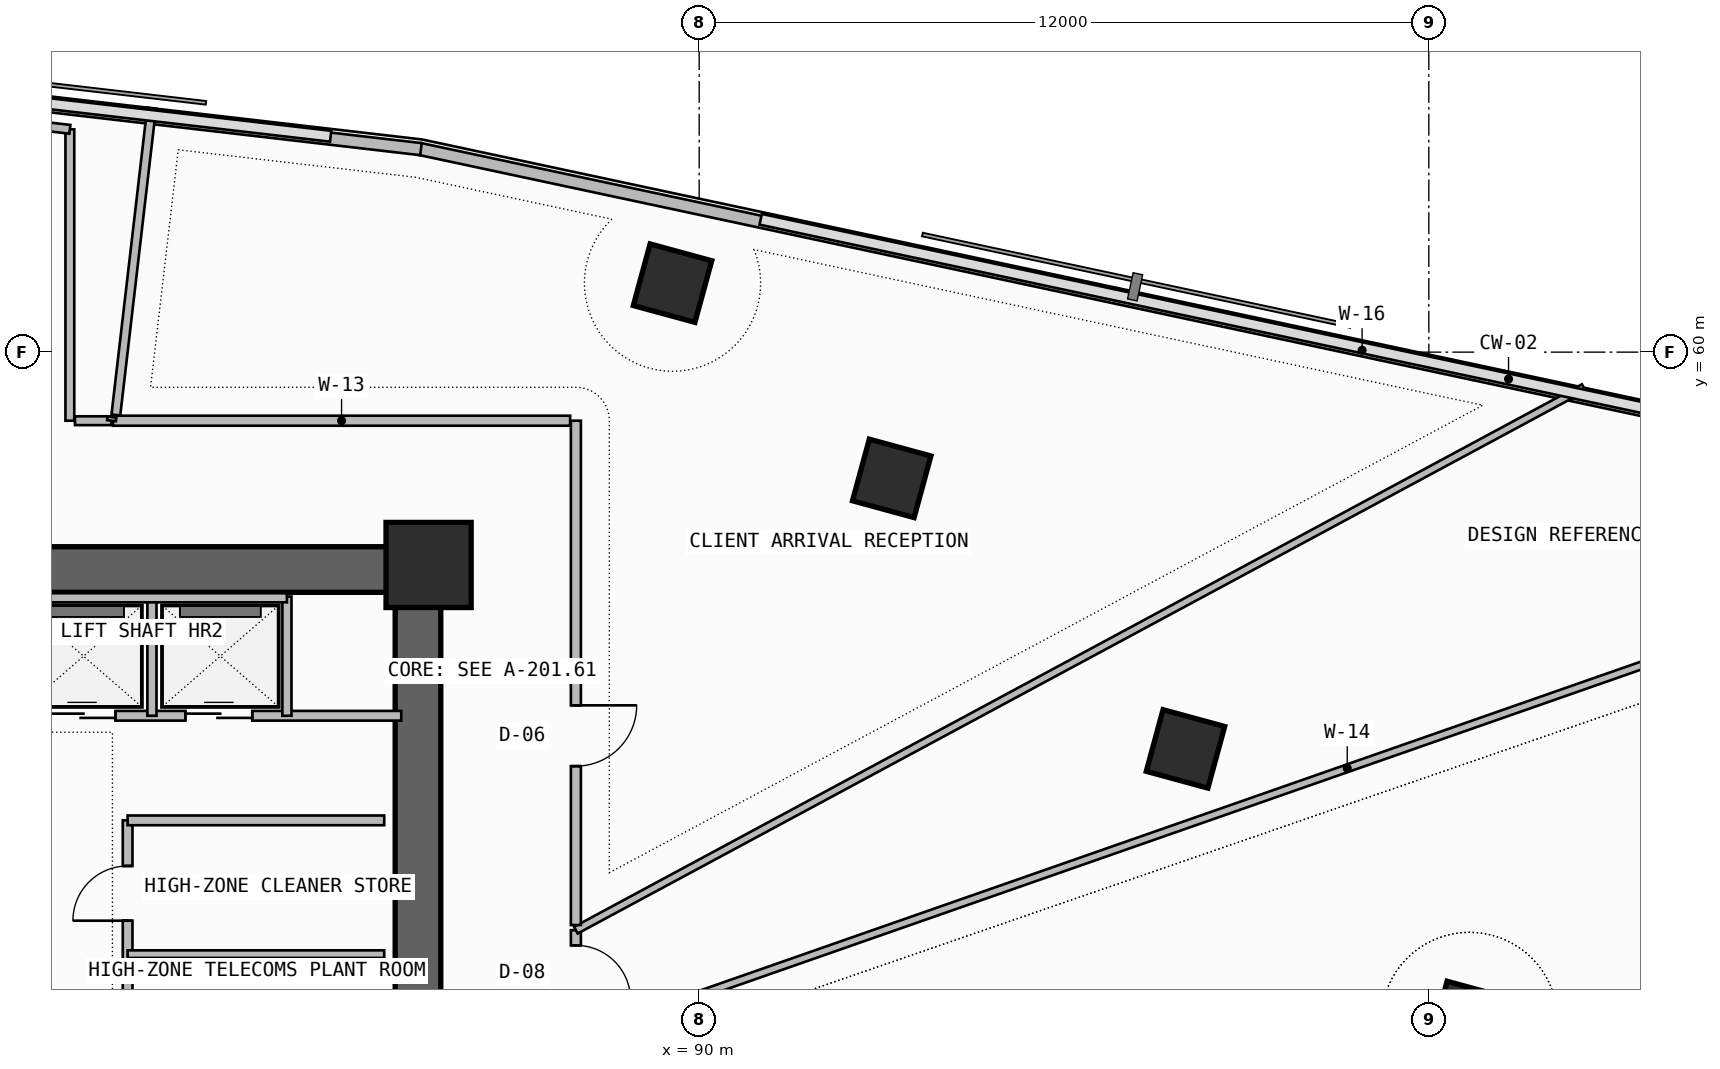
"""IFC4 building model, lengths in metres.
Left out: names, types, materials, properties, quantities, classifications, styles, units other than length and angle.
Written with IfcOpenShell. Run it as: python <this file> out.ifc"""

import sys

from ifc_helpers import new_model, si_unit, direction, frame, frame_2d, origin, origin_2d, place, context, subcontext, project, spatial, rectangle, extrude, element, fill, save


model = new_model("IFC4")
c1 = context("Model", 3, precision=1e-05, world=origin(), true_north=direction((0.0, 1.0)))
c2 = subcontext(c1, "Body", "Model", "MODEL_VIEW")
j1 = project(units=[si_unit("LENGTHUNIT", "METRE"), si_unit("PLANEANGLEUNIT", "RADIAN")], contexts=[c1])
p1 = place(None, origin())
s1 = spatial("IfcSite", under=j1, at=p1, CompositionType="ELEMENT")
p2 = place(p1, origin())
s2 = spatial("IfcBuilding", under=s1, at=p2, CompositionType="ELEMENT")
p3 = place(p2, frame((0.0, 0.0, 218.5)))
s3 = spatial("IfcBuildingStorey", under=s2, at=p3, CompositionType="ELEMENT", Elevation=218.5)
p4 = place(p3, frame((72.0, 56.425, -0.26), z_axis=(0.0, 0.0, 1.0), x_axis=(1.0, 0.0, 0.0)))
e1 = element("IfcWall", 1, at=p4, inside=s3, PredefinedType="SHEAR", context=c2, shape_type="SweptSolid", body=[
    extrude(rectangle(XDim=13.75, YDim=0.75, at=frame_2d((6.875, 0.0))), origin(), (0.0, 0.0, 1.0), 3.52),
])
p5 = place(p3, frame((85.375, 47.6, -0.26), z_axis=(0.0, 0.0, 1.0), x_axis=(0.0, 1.0, 0.0)))
e2 = element("IfcWall", 2, at=p5, inside=s3, PredefinedType="SHEAR", context=c2, shape_type="SweptSolid", body=[
    extrude(rectangle(XDim=8.45, YDim=0.75, at=frame_2d((4.225, 0.0))), origin(), (0.0, 0.0, 1.0), 3.52),
])
p6 = place(p3, frame((85.55, 56.5, 0.0), z_axis=(0.0, 0.0, 1.0), x_axis=(1.0, 0.0, 0.0)))
e3 = element("IfcColumn", 3, at=p6, inside=s3, PredefinedType="COLUMN", context=c2, shape_type="SweptSolid", body=[
    extrude(rectangle(XDim=1.4, YDim=1.4, at=origin_2d()), origin(), (0.0, 0.0, 1.0), 3.52),
])
for number, where, z_axis, x_axis in (
    (4, (102.669, 49.01, 0.0), (0.0, 0.0, 1.0), (0.263, 0.965, 0.0)),
    (5, (97.998, 53.475, 0.0), (0.0, 0.0, 1.0), (0.263, 0.965, 0.0)),
    (6, (93.167, 57.924, 0.0), (0.0, 0.0, 1.0), (0.263, 0.965, 0.0)),
    (7, (89.562, 61.135, 0.0), (0.0, 0.0, 1.0), (0.263, 0.965, 0.0)),
):
    element("IfcColumn", number, at=place(p3, frame(where, z_axis=z_axis, x_axis=x_axis)), inside=s3, PredefinedType="COLUMN", context=c2, shape_type="SweptSolid", body=[
        extrude(rectangle(XDim=1.05, YDim=1.05, at=origin_2d()), origin(), (0.0, 0.0, 1.0), 3.52),
    ])
p7 = place(p3, frame((104.791, 47.25, 0.0), z_axis=(0.0, 0.0, 1.0), x_axis=(0.868193423982, 0.496225934987, 0.0)))
e8 = element("IfcWall", 8, at=p7, inside=s3, PredefinedType="SOLIDWALL", context=c2, shape_type="SweptSolid", body=[
    extrude(rectangle(XDim=12.995, YDim=0.42, at=frame_2d((6.498, 0.0))), origin(), (0.0, 0.0, 1.0), 2.245),
])
p8 = place(p7, frame((7.31, 0.0, 0.965)))
e9 = element("IfcOpeningElement", 9, at=p8, cuts=e8, PredefinedType="OPENING", context=c2, shape_type="SweptSolid", body=[
    extrude(rectangle(XDim=2.4, YDim=1.2, at=frame_2d((1.2, 0.6))), frame((0.0, 0.22, 0.0), z_axis=(0.0, -1.0, 0.0), x_axis=(1.0, 0.0, 0.0)), (0.0, 0.0, 1.0), 0.44),
])
p9 = place(p3, frame((116.396, 56.722, 0.0), z_axis=(0.0, 0.0, 1.0), x_axis=(-0.977936620644, 0.208901809478, 0.0)))
e10 = element("IfcWall", 10, at=p9, inside=s3, PredefinedType="PARAPET", context=c2, shape_type="SweptSolid", body=[
    extrude(rectangle(XDim=31.685, YDim=0.2, at=frame_2d((15.843, 0.0))), origin(), (0.0, 0.0, 1.0), 1.15),
])
p10 = place(p3, frame((85.424, 63.338, 0.0), z_axis=(0.0, 0.0, 1.0), x_axis=(-0.993364714048, 0.115006716693, 0.0)))
e11 = element("IfcWall", 11, at=p10, inside=s3, PredefinedType="PARAPET", context=c2, shape_type="SweptSolid", body=[
    extrude(rectangle(XDim=26.302, YDim=0.2, at=frame_2d((13.151, 0.0))), origin(), (0.0, 0.0, 1.0), 1.15),
])
p11 = place(p3, frame((80.6, 47.7, 0.0), z_axis=(0.0, 0.0, 1.0), x_axis=(0.0, 1.0, 0.0)))
e12 = element("IfcWall", 12, at=p11, inside=s3, PredefinedType="SOLIDWALL", context=c2, shape_type="SweptSolid", body=[
    extrude(rectangle(XDim=4.6, YDim=0.16, at=frame_2d((2.3, 0.0))), origin(), (0.0, 0.0, 1.0), 3.26),
])
p12 = place(p11, frame((0.75, 0.0, 0.0)))
e13 = element("IfcOpeningElement", 13, at=p12, cuts=e12, PredefinedType="OPENING", context=c2, shape_type="SweptSolid", body=[
    extrude(rectangle(XDim=1.0, YDim=2.2, at=frame_2d((0.5, 1.1))), frame((0.0, 0.09, 0.0), z_axis=(0.0, -1.0, 0.0), x_axis=(1.0, 0.0, 0.0)), (0.0, 0.0, 1.0), 0.18),
])
p13 = place(p11, frame((2.95, 0.0, 0.0)))
e14 = element("IfcOpeningElement", 14, at=p13, cuts=e12, PredefinedType="OPENING", context=c2, shape_type="SweptSolid", body=[
    extrude(rectangle(XDim=0.9, YDim=2.1, at=frame_2d((0.45, 1.05))), frame((0.0, 0.09, 0.0), z_axis=(0.0, -1.0, 0.0), x_axis=(1.0, 0.0, 0.0)), (0.0, 0.0, 1.0), 0.18),
])
p14 = place(p3, frame((80.6, 52.3, 0.0), z_axis=(0.0, 0.0, 1.0), x_axis=(1.0, 0.0, 0.0)))
e15 = element("IfcWall", 15, at=p14, inside=s3, PredefinedType="SOLIDWALL", context=c2, shape_type="SweptSolid", body=[
    extrude(rectangle(XDim=4.22, YDim=0.16, at=frame_2d((2.11, 0.0))), origin(), (0.0, 0.0, 1.0), 3.26),
])
p15 = place(p3, frame((80.6, 50.1, 0.0), z_axis=(0.0, 0.0, 1.0), x_axis=(1.0, 0.0, 0.0)))
e16 = element("IfcWall", 16, at=p15, inside=s3, PredefinedType="PARTITIONING", context=c2, shape_type="SweptSolid", body=[
    extrude(rectangle(XDim=4.22, YDim=0.125, at=frame_2d((2.11, 0.0))), origin(), (0.0, 0.0, 1.0), 3.26),
])
p16 = place(p3, frame((73.02, 54.02, 0.0), z_axis=(0.0, 0.0, 1.0), x_axis=(1.0, 0.0, 0.0)))
e17 = element("IfcWall", 17, at=p16, inside=s3, PredefinedType="SOLIDWALL", context=c2, shape_type="SweptSolid", body=[
    extrude(rectangle(XDim=12.08, YDim=0.16, at=frame_2d((6.04, 0.0))), origin(), (0.0, 0.0, 1.0), 3.26),
])
p17 = place(p16, frame((4.03, 0.0, 0.0)))
e18 = element("IfcOpeningElement", 18, at=p17, cuts=e17, PredefinedType="OPENING", context=c2, shape_type="SweptSolid", body=[
    extrude(rectangle(XDim=1.1, YDim=2.25, at=frame_2d((0.55, 1.125))), frame((0.0, 0.09, 0.0), z_axis=(0.0, -1.0, 0.0), x_axis=(1.0, 0.0, 0.0)), (0.0, 0.0, 1.0), 0.18),
])
p18 = place(p16, frame((6.28, 0.0, 0.0)))
e19 = element("IfcOpeningElement", 19, at=p18, cuts=e17, PredefinedType="OPENING", context=c2, shape_type="SweptSolid", body=[
    extrude(rectangle(XDim=1.1, YDim=2.25, at=frame_2d((0.55, 1.125))), frame((0.0, 0.09, 0.0), z_axis=(0.0, -1.0, 0.0), x_axis=(1.0, 0.0, 0.0)), (0.0, 0.0, 1.0), 0.18),
])
p19 = place(p16, frame((8.53, 0.0, 0.0)))
e20 = element("IfcOpeningElement", 20, at=p19, cuts=e17, PredefinedType="OPENING", context=c2, shape_type="SweptSolid", body=[
    extrude(rectangle(XDim=1.1, YDim=2.25, at=frame_2d((0.55, 1.125))), frame((0.0, 0.09, 0.0), z_axis=(0.0, -1.0, 0.0), x_axis=(1.0, 0.0, 0.0)), (0.0, 0.0, 1.0), 0.18),
])
p20 = place(p3, frame((81.0, 54.02, 0.0), z_axis=(0.0, 0.0, 1.0), x_axis=(0.0, 1.0, 0.0)))
e21 = element("IfcWall", 21, at=p20, inside=s3, PredefinedType="PLUMBINGWALL", context=c2, shape_type="SweptSolid", body=[
    extrude(rectangle(XDim=1.96, YDim=0.15, at=frame_2d((0.98, 0.0))), origin(), (0.0, 0.0, 1.0), 3.26),
])
p21 = place(p3, frame((83.22, 54.02, 0.0), z_axis=(0.0, 0.0, 1.0), x_axis=(0.0, 1.0, 0.0)))
e22 = element("IfcWall", 22, at=p21, inside=s3, PredefinedType="SOLIDWALL", context=c2, shape_type="SweptSolid", body=[
    extrude(rectangle(XDim=1.96, YDim=0.15, at=frame_2d((0.98, 0.0))), origin(), (0.0, 0.0, 1.0), 3.26),
])
p22 = place(p3, frame((76.52, 55.96, 0.0), z_axis=(0.0, 0.0, 1.0), x_axis=(1.0, 0.0, 0.0)))
e23 = element("IfcWall", 23, at=p22, inside=s3, PredefinedType="SOLIDWALL", context=c2, shape_type="SweptSolid", body=[
    extrude(rectangle(XDim=6.7, YDim=0.15, at=frame_2d((3.35, 0.0))), origin(), (0.0, 0.0, 1.0), 3.26),
])
p23 = place(p3, frame((88.067, 48.755, 0.0), z_axis=(0.0, 0.0, 1.0), x_axis=(0.943999520405, 0.329946822193, 0.0)))
e24 = element("IfcWall", 24, at=p23, inside=s3, PredefinedType="PARTITIONING", context=c2, shape_type="SweptSolid", body=[
    extrude(rectangle(XDim=26.677, YDim=0.125, at=frame_2d((13.338, 0.0))), origin(), (0.0, 0.0, 1.0), 2.645),
])
p24 = place(p3, frame((87.972, 48.782, 0.0), z_axis=(0.0, 0.0, 1.0), x_axis=(0.0, 1.0, 0.0)))
e25 = element("IfcWall", 25, at=p24, inside=s3, PredefinedType="PARTITIONING", context=c2, shape_type="SweptSolid", body=[
    extrude(rectangle(XDim=1.712, YDim=0.165, at=frame_2d((0.856, 0.0))), origin(), (0.0, 0.0, 1.0), 3.26),
])
p25 = place(p24, frame((0.562, 0.0, 0.0)))
e26 = element("IfcOpeningElement", 26, at=p25, cuts=e25, PredefinedType="OPENING", context=c2, shape_type="SweptSolid", body=[
    extrude(rectangle(XDim=0.9, YDim=2.1, at=frame_2d((0.45, 1.05))), frame((0.0, 0.093, 0.0), z_axis=(0.0, -1.0, 0.0), x_axis=(1.0, 0.0, 0.0)), (0.0, 0.0, 1.0), 0.185),
])
p26 = place(p3, frame((87.972, 50.494, 0.0), z_axis=(0.0, 0.0, 1.0), x_axis=(0.880551461311, 0.473950550146, 0.0)))
e27 = element("IfcWall", 27, at=p26, inside=s3, PredefinedType="PARTITIONING", context=c2, shape_type="SweptSolid", body=[
    extrude(rectangle(XDim=18.824, YDim=0.125, at=frame_2d((9.412, 0.0))), origin(), (0.0, 0.0, 1.0), 2.645),
])
p27 = place(p3, frame((87.972, 50.579, 0.0), z_axis=(0.0, 0.0, 1.0), x_axis=(0.0, 1.0, 0.0)))
e28 = element("IfcWall", 28, at=p27, inside=s3, PredefinedType="PARTITIONING", context=c2, shape_type="SweptSolid", body=[
    extrude(rectangle(XDim=8.293, YDim=0.165, at=frame_2d((4.147, 0.0))), origin(), (0.0, 0.0, 1.0), 2.745),
])
p28 = place(p27, frame((2.613, 0.0, 0.0)))
e29 = element("IfcOpeningElement", 29, at=p28, cuts=e28, PredefinedType="OPENING", context=c2, shape_type="SweptSolid", body=[
    extrude(rectangle(XDim=1.0, YDim=2.2, at=frame_2d((0.5, 1.1))), frame((0.0, 0.093, 0.0), z_axis=(0.0, -1.0, 0.0), x_axis=(1.0, 0.0, 0.0)), (0.0, 0.0, 1.0), 0.185),
])
p29 = place(p3, frame((87.878, 58.872, 0.0), z_axis=(0.0, 0.0, 1.0), x_axis=(-1.0, 0.0, 0.0)))
e30 = element("IfcWall", 30, at=p29, inside=s3, PredefinedType="PARTITIONING", context=c2, shape_type="SweptSolid", body=[
    extrude(rectangle(XDim=7.518, YDim=0.165, at=frame_2d((3.759, 0.0))), origin(), (0.0, 0.0, 1.0), 2.745),
])
p30 = place(p3, frame((80.407, 58.967, 0.0), z_axis=(0.0, 0.0, 1.0), x_axis=(0.115784282811, 0.993274382965, 0.0)))
e31 = element("IfcWall", 31, at=p30, inside=s3, PredefinedType="PARTITIONING", context=c2, shape_type="SweptSolid", body=[
    extrude(rectangle(XDim=5.08, YDim=0.145, at=frame_2d((2.54, 0.0))), origin(), (0.0, 0.0, 1.0), 3.26),
])
p31 = place(p3, frame((79.65, 58.872, 0.0), z_axis=(0.0, 0.0, 1.0), x_axis=(0.0, 1.0, 0.0)))
e32 = element("IfcWall", 32, at=p31, inside=s3, PredefinedType="PARTITIONING", context=c2, shape_type="SweptSolid", body=[
    extrude(rectangle(XDim=4.792, YDim=0.145, at=frame_2d((2.396, 0.0))), origin(), (0.0, 0.0, 1.0), 3.26),
])
p32 = place(p3, frame((79.65, 63.665, 0.0), z_axis=(0.0, 0.0, 1.0), x_axis=(-0.993371485876, 0.11494821029, 0.0)))
e33 = element("IfcWall", 33, at=p32, inside=s3, PredefinedType="PARTITIONING", context=c2, shape_type="SweptSolid", body=[
    extrude(rectangle(XDim=2.23, YDim=0.145, at=frame_2d((1.115, 0.0))), origin(), (0.0, 0.0, 1.0), 3.26),
])
p33 = place(p3, frame((80.335, 58.872, 0.0), z_axis=(0.0, 0.0, 1.0), x_axis=(-1.0, 0.0, 0.0)))
e34 = element("IfcWall", 34, at=p33, inside=s3, PredefinedType="PARTITIONING", context=c2, shape_type="SweptSolid", body=[
    extrude(rectangle(XDim=0.601, YDim=0.145, at=frame_2d((0.3, 0.0))), origin(), (0.0, 0.0, 1.0), 3.26),
])
p34 = place(p3, frame((80.342, 58.932, 0.0), z_axis=(0.0, 0.0, 1.0), x_axis=(-0.117546747581, -0.99306735025, 0.0)))
e35 = element("IfcWall", 35, at=p34, inside=s3, PredefinedType="PARTITIONING", context=c2, shape_type="SweptSolid", body=[
    extrude(rectangle(XDim=0.06, YDim=0.145, at=frame_2d((0.03, 0.0))), origin(), (0.0, 0.0, 1.0), 3.26),
])
p35 = place(p13, origin())
e36 = element("IfcDoor", 36, at=p35, inside=s3, OperationType="SINGLE_SWING_LEFT", PredefinedType="DOOR", context=c2, shape_type="SweptSolid", body=[
    extrude(rectangle(XDim=0.9, YDim=2.1, at=frame_2d((0.45, 1.05))), frame((0.0, 0.025, 0.0), z_axis=(0.0, -1.0, 0.0), x_axis=(1.0, 0.0, 0.0)), (0.0, 0.0, 1.0), 0.05),
])
fill(e14, e36)
p36 = place(p18, origin())
e37 = element("IfcDoor", 37, at=p36, inside=s3, OperationType="DOUBLE_DOOR_SLIDING", PredefinedType="DOOR", context=c2, shape_type="SweptSolid", body=[
    extrude(rectangle(XDim=1.1, YDim=2.25, at=frame_2d((0.55, 1.125))), frame((0.0, 0.025, 0.0), z_axis=(0.0, -1.0, 0.0), x_axis=(1.0, 0.0, 0.0)), (0.0, 0.0, 1.0), 0.05),
])
fill(e19, e37)
p37 = place(p19, origin())
e38 = element("IfcDoor", 38, at=p37, inside=s3, OperationType="DOUBLE_DOOR_SLIDING", PredefinedType="DOOR", context=c2, shape_type="SweptSolid", body=[
    extrude(rectangle(XDim=1.1, YDim=2.25, at=frame_2d((0.55, 1.125))), frame((0.0, 0.025, 0.0), z_axis=(0.0, -1.0, 0.0), x_axis=(1.0, 0.0, 0.0)), (0.0, 0.0, 1.0), 0.05),
])
fill(e20, e38)
p38 = place(p25, frame((0.9, 0.0, 0.0), z_axis=(0.0, 0.0, 1.0), x_axis=(-1.0, 0.0, 0.0)))
e39 = element("IfcDoor", 39, at=p38, inside=s3, OperationType="SINGLE_SWING_RIGHT", PredefinedType="DOOR", context=c2, shape_type="SweptSolid", body=[
    extrude(rectangle(XDim=0.9, YDim=2.1, at=frame_2d((0.45, 1.05))), frame((0.0, 0.025, 0.0), z_axis=(0.0, -1.0, 0.0), x_axis=(1.0, 0.0, 0.0)), (0.0, 0.0, 1.0), 0.05),
])
fill(e26, e39)
p39 = place(p28, frame((1.0, 0.0, 0.0), z_axis=(0.0, 0.0, 1.0), x_axis=(-1.0, 0.0, 0.0)))
e40 = element("IfcDoor", 40, at=p39, inside=s3, OperationType="SINGLE_SWING_LEFT", PredefinedType="DOOR", context=c2, shape_type="SweptSolid", body=[
    extrude(rectangle(XDim=1.0, YDim=2.2, at=frame_2d((0.5, 1.1))), frame((0.0, 0.025, 0.0), z_axis=(0.0, -1.0, 0.0), x_axis=(1.0, 0.0, 0.0)), (0.0, 0.0, 1.0), 0.05),
])
fill(e29, e40)
save(model, sys.argv[1])
